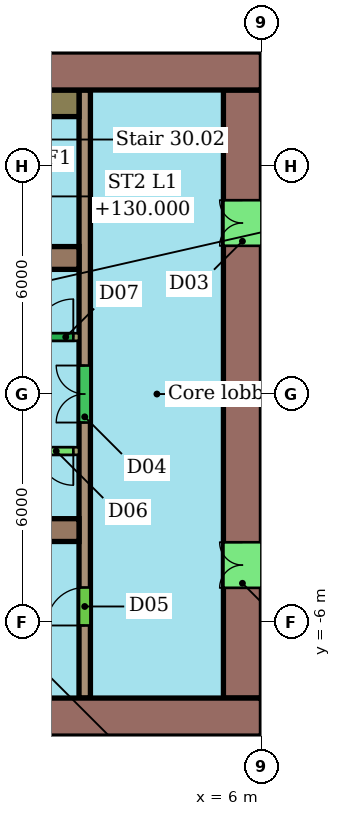
"""IFC4 building model, lengths in metres.
Left out: names, types, materials, properties, quantities, classifications, styles, units other than length and angle.
Written with IfcOpenShell. Run it as: python <this file> out.ifc"""

import sys

from ifc_helpers import new_model, si_unit, direction, frame, frame_2d, origin, place, context, subcontext, project, spatial, rectangle, extrude, element, fill, save


model = new_model("IFC4")
c1 = context("Model", 3, precision=1e-05, world=origin(), true_north=direction((0.0, 1.0)))
c2 = subcontext(c1, "Body", "Model", "MODEL_VIEW")
j1 = project(units=[si_unit("LENGTHUNIT", "METRE"), si_unit("PLANEANGLEUNIT", "RADIAN")], contexts=[c1])
p1 = place(None, origin())
s1 = spatial("IfcSite", under=j1, at=p1, CompositionType="ELEMENT")
p2 = place(p1, origin())
s2 = spatial("IfcBuilding", under=s1, at=p2, CompositionType="ELEMENT")
p3 = place(p2, frame((0.0, 0.0, 128.2)))
s3 = spatial("IfcBuildingStorey", under=s2, at=p3, CompositionType="ELEMENT", Elevation=128.2)
p4 = place(p3, frame((6.0, 8.5, 0.0), z_axis=(0.0, 0.0, 1.0), x_axis=(-1.0, 0.0, 0.0)))
e1 = element("IfcWall", 1, at=p4, inside=s3, PredefinedType="SHEAR", context=c2, shape_type="SweptSolid", body=[
    extrude(rectangle(XDim=12.0, YDim=1.0, at=frame_2d((6.0, 0.0))), origin(), (0.0, 0.0, 1.0), 3.3),
])
p5 = place(p4, frame((5.6, 0.0, 0.0)))
e2 = element("IfcOpeningElement", 2, at=p5, cuts=e1, PredefinedType="OPENING", context=c2, shape_type="SweptSolid", body=[
    extrude(rectangle(XDim=1.2, YDim=2.1, at=frame_2d((0.6, 1.05))), frame((0.0, 0.51, 0.0), z_axis=(0.0, -1.0, 0.0), x_axis=(1.0, 0.0, 0.0)), (0.0, 0.0, 1.0), 1.02),
])
p6 = place(p3, frame((-18.0, -8.5, 0.0), z_axis=(0.0, 0.0, 1.0), x_axis=(1.0, 0.0, 0.0)))
e3 = element("IfcWall", 3, at=p6, inside=s3, PredefinedType="SHEAR", context=c2, shape_type="SweptSolid", body=[
    extrude(rectangle(XDim=24.0, YDim=1.0, at=frame_2d((12.0, 0.0))), origin(), (0.0, 0.0, 1.0), 3.3),
])
p7 = place(p6, frame((6.0, 0.0, 0.0)))
e4 = element("IfcOpeningElement", 4, at=p7, cuts=e3, PredefinedType="OPENING", context=c2, shape_type="SweptSolid", body=[
    extrude(rectangle(XDim=1.2, YDim=2.1, at=frame_2d((0.6, 1.05))), frame((0.0, 0.51, 0.0), z_axis=(0.0, -1.0, 0.0), x_axis=(1.0, 0.0, 0.0)), (0.0, 0.0, 1.0), 1.02),
])
p8 = place(p3, frame((5.5, -8.0, 0.0), z_axis=(0.0, 0.0, 1.0), x_axis=(0.0, 1.0, 0.0)))
e5 = element("IfcWall", 5, at=p8, inside=s3, PredefinedType="SHEAR", context=c2, shape_type="SweptSolid", body=[
    extrude(rectangle(XDim=16.0, YDim=1.0, at=frame_2d((8.0, 0.0))), origin(), (0.0, 0.0, 1.0), 3.3),
])
p9 = place(p8, frame((2.9, 0.0, 0.0)))
e6 = element("IfcOpeningElement", 6, at=p9, cuts=e5, PredefinedType="OPENING", context=c2, shape_type="SweptSolid", body=[
    extrude(rectangle(XDim=1.2, YDim=2.1, at=frame_2d((0.6, 1.05))), frame((0.0, 0.51, 0.0), z_axis=(0.0, -1.0, 0.0), x_axis=(1.0, 0.0, 0.0)), (0.0, 0.0, 1.0), 1.02),
])
p10 = place(p8, frame((11.9, 0.0, 0.0)))
e7 = element("IfcOpeningElement", 7, at=p10, cuts=e5, PredefinedType="OPENING", context=c2, shape_type="SweptSolid", body=[
    extrude(rectangle(XDim=1.2, YDim=2.1, at=frame_2d((0.6, 1.05))), frame((0.0, 0.51, 0.0), z_axis=(0.0, -1.0, 0.0), x_axis=(1.0, 0.0, 0.0)), (0.0, 0.0, 1.0), 1.02),
])
for number, where, z_axis, x_axis in (
    (8, (-6.0, 3.58, 0.0), (0.0, 0.0, 1.0), (1.0, 0.0, 0.0)),
    (9, (-6.0, -3.58, 0.0), (0.0, 0.0, 1.0), (1.0, 0.0, 0.0)),
):
    element("IfcWall", number, at=place(p3, frame(where, z_axis=z_axis, x_axis=x_axis)), inside=s3, PredefinedType="SHEAR", context=c2, shape_type="SweptSolid", body=[
        extrude(rectangle(XDim=7.2, YDim=0.6, at=frame_2d((3.6, 0.0))), origin(), (0.0, 0.0, 1.0), 3.3),
    ])
p11 = place(p3, frame((1.35, -8.0, 0.0), z_axis=(0.0, 0.0, 1.0), x_axis=(0.0, 1.0, 0.0)))
e10 = element("IfcWall", 10, at=p11, inside=s3, PredefinedType="SHEAR", context=c2, shape_type="SweptSolid", body=[
    extrude(rectangle(XDim=16.0, YDim=0.3, at=frame_2d((8.0, 0.0))), origin(), (0.0, 0.0, 1.0), 3.3),
])
p12 = place(p11, frame((1.91, 0.0, 0.0)))
e11 = element("IfcOpeningElement", 11, at=p12, cuts=e10, PredefinedType="OPENING", context=c2, shape_type="SweptSolid", body=[
    extrude(rectangle(XDim=1.0, YDim=2.1, at=frame_2d((0.5, 1.05))), frame((0.0, 0.16, 0.0), z_axis=(0.0, -1.0, 0.0), x_axis=(1.0, 0.0, 0.0)), (0.0, 0.0, 1.0), 0.32),
])
p13 = place(p11, frame((7.25, 0.0, 0.0)))
e12 = element("IfcOpeningElement", 12, at=p13, cuts=e10, PredefinedType="OPENING", context=c2, shape_type="SweptSolid", body=[
    extrude(rectangle(XDim=1.5, YDim=2.1, at=frame_2d((0.75, 1.05))), frame((0.0, 0.16, 0.0), z_axis=(0.0, -1.0, 0.0), x_axis=(1.0, 0.0, 0.0)), (0.0, 0.0, 1.0), 0.32),
])
p14 = place(p3, frame((-13.2, 1.5, 0.0), z_axis=(0.0, 0.0, 1.0), x_axis=(1.0, 0.0, 0.0)))
e13 = element("IfcWall", 13, at=p14, inside=s3, PredefinedType="SHEAR", context=c2, shape_type="SweptSolid", body=[
    extrude(rectangle(XDim=14.4, YDim=0.2, at=frame_2d((7.2, 0.0))), origin(), (0.0, 0.0, 1.0), 3.3),
])
p15 = place(p14, frame((0.546, 0.0, 0.0)))
e14 = element("IfcOpeningElement", 14, at=p15, cuts=e13, PredefinedType="OPENING", context=c2, shape_type="SweptSolid", body=[
    extrude(rectangle(XDim=1.1, YDim=2.1, at=frame_2d((0.55, 1.05))), frame((0.0, 0.11, 0.0), z_axis=(0.0, -1.0, 0.0), x_axis=(1.0, 0.0, 0.0)), (0.0, 0.0, 1.0), 0.22),
])
p16 = place(p14, frame((2.988, 0.0, 0.0)))
e15 = element("IfcOpeningElement", 15, at=p16, cuts=e13, PredefinedType="OPENING", context=c2, shape_type="SweptSolid", body=[
    extrude(rectangle(XDim=1.1, YDim=2.1, at=frame_2d((0.55, 1.05))), frame((0.0, 0.11, 0.0), z_axis=(0.0, -1.0, 0.0), x_axis=(1.0, 0.0, 0.0)), (0.0, 0.0, 1.0), 0.22),
])
p17 = place(p14, frame((5.429, 0.0, 0.0)))
e16 = element("IfcOpeningElement", 16, at=p17, cuts=e13, PredefinedType="OPENING", context=c2, shape_type="SweptSolid", body=[
    extrude(rectangle(XDim=1.1, YDim=2.1, at=frame_2d((0.55, 1.05))), frame((0.0, 0.11, 0.0), z_axis=(0.0, -1.0, 0.0), x_axis=(1.0, 0.0, 0.0)), (0.0, 0.0, 1.0), 0.22),
])
p18 = place(p14, frame((7.871, 0.0, 0.0)))
e17 = element("IfcOpeningElement", 17, at=p18, cuts=e13, PredefinedType="OPENING", context=c2, shape_type="SweptSolid", body=[
    extrude(rectangle(XDim=1.1, YDim=2.1, at=frame_2d((0.55, 1.05))), frame((0.0, 0.11, 0.0), z_axis=(0.0, -1.0, 0.0), x_axis=(1.0, 0.0, 0.0)), (0.0, 0.0, 1.0), 0.22),
])
p19 = place(p14, frame((11.607, 0.0, 0.0)))
e18 = element("IfcOpeningElement", 18, at=p19, cuts=e13, PredefinedType="OPENING", context=c2, shape_type="SweptSolid", body=[
    extrude(rectangle(XDim=0.9, YDim=2.1, at=frame_2d((0.45, 1.05))), frame((0.0, 0.11, 0.0), z_axis=(0.0, -1.0, 0.0), x_axis=(1.0, 0.0, 0.0)), (0.0, 0.0, 1.0), 0.22),
])
p20 = place(p14, frame((13.25, 0.0, 0.0)))
e19 = element("IfcOpeningElement", 19, at=p20, cuts=e13, PredefinedType="OPENING", context=c2, shape_type="SweptSolid", body=[
    extrude(rectangle(XDim=1.0, YDim=2.1, at=frame_2d((0.5, 1.05))), frame((0.0, 0.11, 0.0), z_axis=(0.0, -1.0, 0.0), x_axis=(1.0, 0.0, 0.0)), (0.0, 0.0, 1.0), 0.22),
])
p21 = place(p3, frame((1.2, -1.5, 0.0), z_axis=(0.0, 0.0, 1.0), x_axis=(-1.0, 0.0, 0.0)))
e20 = element("IfcWall", 20, at=p21, inside=s3, PredefinedType="SHEAR", context=c2, shape_type="SweptSolid", body=[
    extrude(rectangle(XDim=14.4, YDim=0.2, at=frame_2d((7.2, 0.0))), origin(), (0.0, 0.0, 1.0), 3.3),
])
p22 = place(p21, frame((7.821, 0.0, 0.0)))
e21 = element("IfcOpeningElement", 21, at=p22, cuts=e20, PredefinedType="OPENING", context=c2, shape_type="SweptSolid", body=[
    extrude(rectangle(XDim=1.2, YDim=2.1, at=frame_2d((0.6, 1.05))), frame((0.0, 0.11, 0.0), z_axis=(0.0, -1.0, 0.0), x_axis=(1.0, 0.0, 0.0)), (0.0, 0.0, 1.0), 0.22),
])
p23 = place(p21, frame((0.15, 0.0, 0.0)))
e22 = element("IfcOpeningElement", 22, at=p23, cuts=e20, PredefinedType="OPENING", context=c2, shape_type="SweptSolid", body=[
    extrude(rectangle(XDim=0.9, YDim=2.1, at=frame_2d((0.45, 1.05))), frame((0.0, 0.11, 0.0), z_axis=(0.0, -1.0, 0.0), x_axis=(1.0, 0.0, 0.0)), (0.0, 0.0, 1.0), 0.22),
])
p24 = place(p3, frame((0.4, 7.65, 0.0), z_axis=(0.0, 0.0, 1.0), x_axis=(1.0, 0.0, 0.0)))
e23 = element("IfcWall", 23, at=p24, inside=s3, PredefinedType="SHEAR", context=c2, shape_type="SweptSolid", body=[
    extrude(rectangle(XDim=0.8, YDim=0.7, at=frame_2d((0.4, 0.0))), origin(), (0.0, 0.0, 1.0), 3.3),
])
p25 = place(p9, origin())
e24 = element("IfcDoor", 24, at=p25, inside=s3, OperationType="DOUBLE_DOOR_SINGLE_SWING", PredefinedType="NOTDEFINED", context=c2, shape_type="SweptSolid", body=[
    extrude(rectangle(XDim=1.2, YDim=2.1, at=frame_2d((0.6, 1.05))), frame((0.0, 0.025, 0.0), z_axis=(0.0, -1.0, 0.0), x_axis=(1.0, 0.0, 0.0)), (0.0, 0.0, 1.0), 0.05),
])
fill(e6, e24)
p26 = place(p10, origin())
e25 = element("IfcDoor", 25, at=p26, inside=s3, OperationType="DOUBLE_DOOR_SINGLE_SWING", PredefinedType="NOTDEFINED", context=c2, shape_type="SweptSolid", body=[
    extrude(rectangle(XDim=1.2, YDim=2.1, at=frame_2d((0.6, 1.05))), frame((0.0, 0.025, 0.0), z_axis=(0.0, -1.0, 0.0), x_axis=(1.0, 0.0, 0.0)), (0.0, 0.0, 1.0), 0.05),
])
fill(e7, e25)
p27 = place(p12, origin())
e26 = element("IfcDoor", 26, at=p27, inside=s3, OperationType="SINGLE_SWING_LEFT", PredefinedType="NOTDEFINED", context=c2, shape_type="SweptSolid", body=[
    extrude(rectangle(XDim=1.0, YDim=2.1, at=frame_2d((0.5, 1.05))), frame((0.0, 0.025, 0.0), z_axis=(0.0, -1.0, 0.0), x_axis=(1.0, 0.0, 0.0)), (0.0, 0.0, 1.0), 0.05),
])
fill(e11, e26)
p28 = place(p13, origin())
e27 = element("IfcDoor", 27, at=p28, inside=s3, OperationType="DOUBLE_DOOR_SINGLE_SWING", PredefinedType="NOTDEFINED", context=c2, shape_type="SweptSolid", body=[
    extrude(rectangle(XDim=1.5, YDim=2.1, at=frame_2d((0.75, 1.05))), frame((0.0, 0.025, 0.0), z_axis=(0.0, -1.0, 0.0), x_axis=(1.0, 0.0, 0.0)), (0.0, 0.0, 1.0), 0.05),
])
fill(e12, e27)
p29 = place(p20, origin())
e28 = element("IfcDoor", 28, at=p29, inside=s3, OperationType="SINGLE_SWING_RIGHT", PredefinedType="NOTDEFINED", context=c2, shape_type="SweptSolid", body=[
    extrude(rectangle(XDim=1.0, YDim=2.1, at=frame_2d((0.5, 1.05))), frame((0.0, 0.025, 0.0), z_axis=(0.0, -1.0, 0.0), x_axis=(1.0, 0.0, 0.0)), (0.0, 0.0, 1.0), 0.05),
])
fill(e19, e28)
p30 = place(p23, origin())
e29 = element("IfcDoor", 29, at=p30, inside=s3, OperationType="SINGLE_SWING_LEFT", PredefinedType="NOTDEFINED", context=c2, shape_type="SweptSolid", body=[
    extrude(rectangle(XDim=0.9, YDim=2.1, at=frame_2d((0.45, 1.05))), frame((0.0, 0.025, 0.0), z_axis=(0.0, -1.0, 0.0), x_axis=(1.0, 0.0, 0.0)), (0.0, 0.0, 1.0), 0.05),
])
fill(e22, e29)
save(model, sys.argv[1])
